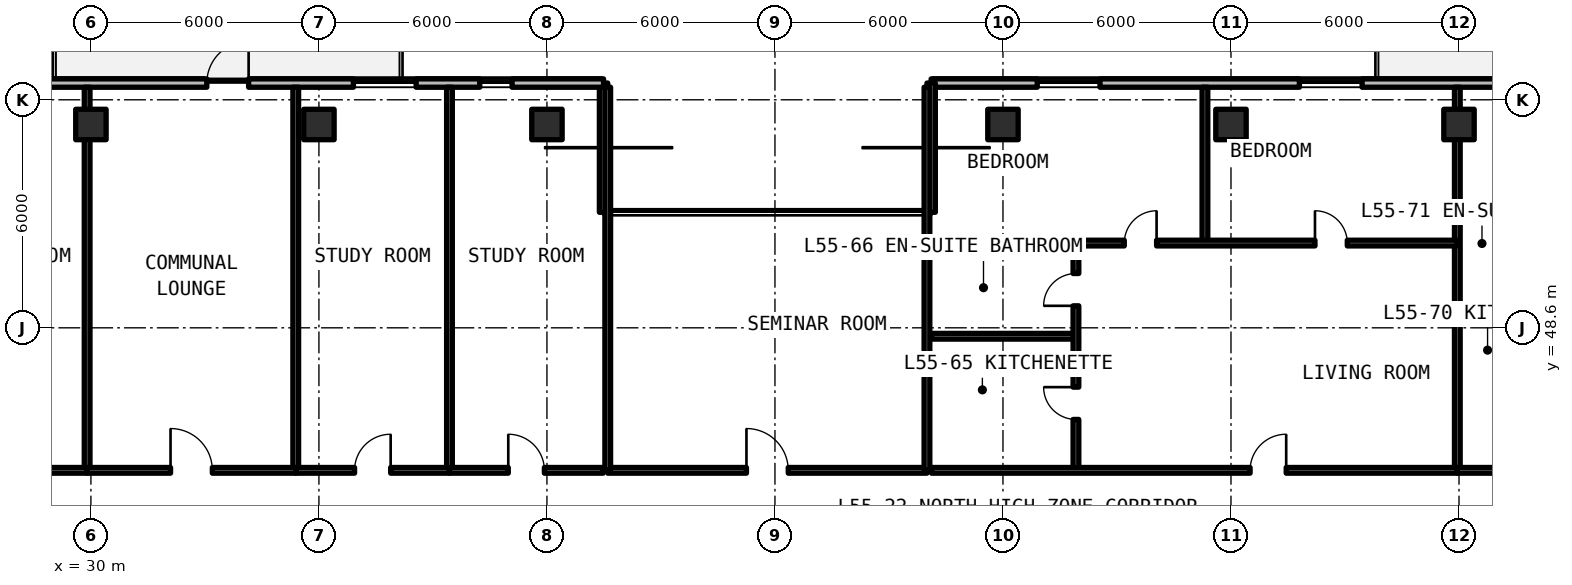
"""IFC4 building model, lengths in metres.
Left out: names, types, materials, properties, quantities, classifications, styles, units other than length and angle.
Written with IfcOpenShell. Run it as: python <this file> out.ifc"""

import sys

from ifc_helpers import new_model, si_unit, direction, frame, frame_2d, origin, origin_2d, place, context, subcontext, project, spatial, rectangle, extrude, element, fill, save


model = new_model("IFC4")
c1 = context("Model", 3, precision=1e-05, world=origin(), true_north=direction((0.0, 1.0)))
c2 = subcontext(c1, "Body", "Model", "MODEL_VIEW")
j1 = project(units=[si_unit("LENGTHUNIT", "METRE"), si_unit("PLANEANGLEUNIT", "RADIAN")], contexts=[c1])
p1 = place(None, origin())
s1 = spatial("IfcSite", under=j1, at=p1, CompositionType="ELEMENT")
p2 = place(p1, origin())
s2 = spatial("IfcBuilding", under=s1, at=p2, CompositionType="ELEMENT")
p3 = place(p2, frame((0.0, 0.0, 198.33)))
s3 = spatial("IfcBuildingStorey", under=s2, at=p3, CompositionType="ELEMENT", Elevation=198.33)
for number, where, z_axis, x_axis in (
    (1, (30.0, 53.95, 0.0), (0.0, 0.0, 1.0), (1.0, 0.0, 0.0)),
    (2, (36.0, 53.95, 0.0), (0.0, 0.0, 1.0), (1.0, 0.0, 0.0)),
    (3, (42.0, 53.95, 0.0), (0.0, 0.0, 1.0), (1.0, 0.0, 0.0)),
    (4, (54.0, 53.95, 0.0), (0.0, 0.0, 1.0), (1.0, 0.0, 0.0)),
    (5, (60.0, 53.95, 0.0), (0.0, 0.0, 1.0), (1.0, 0.0, 0.0)),
    (6, (66.0, 53.95, 0.0), (0.0, 0.0, 1.0), (1.0, 0.0, 0.0)),
):
    element("IfcColumn", number, at=place(p3, frame(where, z_axis=z_axis, x_axis=x_axis)), inside=s3, PredefinedType="COLUMN", context=c2, shape_type="SweptSolid", body=[
        extrude(rectangle(XDim=0.8, YDim=0.8, at=origin_2d()), origin(), (0.0, 0.0, 1.0), 3.3),
    ])
p4 = place(p3, frame((95.354, 55.04, 0.0), z_axis=(0.0, 0.0, 1.0), x_axis=(-1.0, 0.0, 0.0)))
e7 = element("IfcWall", 7, at=p4, inside=s3, PredefinedType="SOLIDWALL", context=c2, shape_type="SweptSolid", body=[
    extrude(rectangle(XDim=43.244, YDim=0.22, at=frame_2d((21.622, 0.0))), origin(), (0.0, 0.0, 1.0), 3.08),
])
p5 = place(p4, frame((26.404, 0.0, 0.0)))
e8 = element("IfcOpeningElement", 8, at=p5, cuts=e7, PredefinedType="OPENING", context=c2, shape_type="SweptSolid", body=[
    extrude(rectangle(XDim=1.1, YDim=2.15, at=frame_2d((0.55, 1.075))), frame((0.0, 0.12, 0.0), z_axis=(0.0, -1.0, 0.0), x_axis=(1.0, 0.0, 0.0)), (0.0, 0.0, 1.0), 0.24),
])
p6 = place(p4, frame((14.554, 0.0, 0.0)))
e9 = element("IfcOpeningElement", 9, at=p6, cuts=e7, PredefinedType="OPENING", context=c2, shape_type="SweptSolid", body=[
    extrude(rectangle(XDim=1.1, YDim=2.15, at=frame_2d((0.55, 1.075))), frame((0.0, 0.12, 0.0), z_axis=(0.0, -1.0, 0.0), x_axis=(1.0, 0.0, 0.0)), (0.0, 0.0, 1.0), 0.24),
])
p7 = place(p4, frame((38.802, 0.0, 0.78)))
e10 = element("IfcOpeningElement", 10, at=p7, cuts=e7, PredefinedType="OPENING", context=c2, shape_type="SweptSolid", body=[
    extrude(rectangle(XDim=1.65, YDim=1.66, at=frame_2d((0.825, 0.83))), frame((0.0, 0.12, 0.0), z_axis=(0.0, -1.0, 0.0), x_axis=(1.0, 0.0, 0.0)), (0.0, 0.0, 1.0), 0.24),
])
p8 = place(p4, frame((31.904, 0.0, 0.78)))
e11 = element("IfcOpeningElement", 11, at=p8, cuts=e7, PredefinedType="OPENING", context=c2, shape_type="SweptSolid", body=[
    extrude(rectangle(XDim=1.65, YDim=1.66, at=frame_2d((0.825, 0.83))), frame((0.0, 0.12, 0.0), z_axis=(0.0, -1.0, 0.0), x_axis=(1.0, 0.0, 0.0)), (0.0, 0.0, 1.0), 0.24),
])
p9 = place(p4, frame((7.682, 0.0, 0.78)))
e12 = element("IfcOpeningElement", 12, at=p9, cuts=e7, PredefinedType="OPENING", context=c2, shape_type="SweptSolid", body=[
    extrude(rectangle(XDim=0.85, YDim=1.65, at=frame_2d((0.425, 0.825))), frame((0.0, 0.12, 0.0), z_axis=(0.0, -1.0, 0.0), x_axis=(1.0, 0.0, 0.0)), (0.0, 0.0, 1.0), 0.24),
])
p10 = place(p4, frame((2.899, 0.0, 0.78)))
e13 = element("IfcOpeningElement", 13, at=p10, cuts=e7, PredefinedType="OPENING", context=c2, shape_type="SweptSolid", body=[
    extrude(rectangle(XDim=1.65, YDim=1.66, at=frame_2d((0.825, 0.83))), frame((0.0, 0.12, 0.0), z_axis=(0.0, -1.0, 0.0), x_axis=(1.0, 0.0, 0.0)), (0.0, 0.0, 1.0), 0.24),
])
for number, where, z_axis, x_axis in (
    (14, (52.11, 55.04, 0.0), (0.0, 0.0, 1.0), (0.0, -1.0, 0.0)),
    (15, (43.49, 51.64, 0.0), (0.0, 0.0, 1.0), (0.0, 1.0, 0.0)),
):
    element("IfcWall", number, at=place(p3, frame(where, z_axis=z_axis, x_axis=x_axis)), inside=s3, PredefinedType="SOLIDWALL", context=c2, shape_type="SweptSolid", body=[
        extrude(rectangle(XDim=3.4, YDim=0.22, at=frame_2d((1.7, 0.0))), origin(), (0.0, 0.0, 1.0), 3.08),
    ])
p11 = place(p3, frame((43.49, 55.04, 0.0), z_axis=(0.0, 0.0, 1.0), x_axis=(-1.0, 0.0, 0.0)))
e16 = element("IfcWall", 16, at=p11, inside=s3, PredefinedType="SOLIDWALL", context=c2, shape_type="SweptSolid", body=[
    extrude(rectangle(XDim=17.644, YDim=0.22, at=frame_2d((8.822, 0.0))), origin(), (0.0, 0.0, 1.0), 3.08),
])
p12 = place(p11, frame((9.34, 0.0, 0.0)))
e17 = element("IfcOpeningElement", 17, at=p12, cuts=e16, PredefinedType="OPENING", context=c2, shape_type="SweptSolid", body=[
    extrude(rectangle(XDim=1.1, YDim=2.15, at=frame_2d((0.55, 1.075))), frame((0.0, 0.12, 0.0), z_axis=(0.0, -1.0, 0.0), x_axis=(1.0, 0.0, 0.0)), (0.0, 0.0, 1.0), 0.24),
])
p13 = place(p11, frame((14.715, 0.0, 0.78)))
e18 = element("IfcOpeningElement", 18, at=p13, cuts=e16, PredefinedType="OPENING", context=c2, shape_type="SweptSolid", body=[
    extrude(rectangle(XDim=1.65, YDim=1.66, at=frame_2d((0.825, 0.83))), frame((0.0, 0.12, 0.0), z_axis=(0.0, -1.0, 0.0), x_axis=(1.0, 0.0, 0.0)), (0.0, 0.0, 1.0), 0.24),
])
p14 = place(p11, frame((4.932, 0.0, 0.78)))
e19 = element("IfcOpeningElement", 19, at=p14, cuts=e16, PredefinedType="OPENING", context=c2, shape_type="SweptSolid", body=[
    extrude(rectangle(XDim=1.65, YDim=1.66, at=frame_2d((0.825, 0.83))), frame((0.0, 0.12, 0.0), z_axis=(0.0, -1.0, 0.0), x_axis=(1.0, 0.0, 0.0)), (0.0, 0.0, 1.0), 0.24),
])
p15 = place(p11, frame((2.407, 0.0, 0.78)))
e20 = element("IfcOpeningElement", 20, at=p15, cuts=e16, PredefinedType="OPENING", context=c2, shape_type="SweptSolid", body=[
    extrude(rectangle(XDim=0.85, YDim=1.65, at=frame_2d((0.425, 0.825))), frame((0.0, 0.12, 0.0), z_axis=(0.0, -1.0, 0.0), x_axis=(1.0, 0.0, 0.0)), (0.0, 0.0, 1.0), 0.24),
])
p16 = place(p3, frame((43.6, 44.85, 0.0), z_axis=(0.0, 0.0, 1.0), x_axis=(1.0, 0.0, 0.0)))
e21 = element("IfcWall", 21, at=p16, inside=s3, PredefinedType="SOLIDWALL", context=c2, shape_type="SweptSolid", body=[
    extrude(rectangle(XDim=8.4, YDim=0.15, at=frame_2d((4.2, 0.0))), origin(), (0.0, 0.0, 1.0), 2.35),
])
p17 = place(p16, frame((3.65, 0.0, 0.0)))
e22 = element("IfcOpeningElement", 22, at=p17, cuts=e21, PredefinedType="OPENING", context=c2, shape_type="SweptSolid", body=[
    extrude(rectangle(XDim=1.1, YDim=2.15, at=frame_2d((0.55, 1.075))), frame((0.0, 0.085, 0.0), z_axis=(0.0, -1.0, 0.0), x_axis=(1.0, 0.0, 0.0)), (0.0, 0.0, 1.0), 0.17),
])
for number, where, z_axis, x_axis in (
    (23, (43.6, 44.85, 0.0), (0.0, 0.0, 1.0), (0.0, 1.0, 0.0)),
    (24, (52.0, 44.85, 0.0), (0.0, 0.0, 1.0), (0.0, 1.0, 0.0)),
    (25, (29.9, 44.85, 0.0), (0.0, 0.0, 1.0), (0.0, 1.0, 0.0)),
):
    element("IfcWall", number, at=place(p3, frame(where, z_axis=z_axis, x_axis=x_axis)), inside=s3, PredefinedType="SOLIDWALL", context=c2, shape_type="SweptSolid", body=[
        extrude(rectangle(XDim=10.08, YDim=0.15, at=frame_2d((5.04, 0.0))), origin(), (0.0, 0.0, 1.0), 2.35),
    ])
p18 = place(p3, frame((26.0, 44.85, 0.0), z_axis=(0.0, 0.0, 1.0), x_axis=(1.0, 0.0, 0.0)))
e26 = element("IfcWall", 26, at=p18, inside=s3, PredefinedType="SOLIDWALL", context=c2, shape_type="SweptSolid", body=[
    extrude(rectangle(XDim=3.9, YDim=0.15, at=frame_2d((1.95, 0.0))), origin(), (0.0, 0.0, 1.0), 2.35),
])
p19 = place(p18, frame((1.475, 0.0, 0.0)))
e27 = element("IfcOpeningElement", 27, at=p19, cuts=e26, PredefinedType="OPENING", context=c2, shape_type="SweptSolid", body=[
    extrude(rectangle(XDim=0.95, YDim=2.15, at=frame_2d((0.475, 1.075))), frame((0.0, 0.085, 0.0), z_axis=(0.0, -1.0, 0.0), x_axis=(1.0, 0.0, 0.0)), (0.0, 0.0, 1.0), 0.17),
])
p20 = place(p3, frame((35.39, 44.85, 0.0), z_axis=(0.0, 0.0, 1.0), x_axis=(0.0, 1.0, 0.0)))
e28 = element("IfcWall", 28, at=p20, inside=s3, PredefinedType="SOLIDWALL", context=c2, shape_type="SweptSolid", body=[
    extrude(rectangle(XDim=10.08, YDim=0.15, at=frame_2d((5.04, 0.0))), origin(), (0.0, 0.0, 1.0), 2.35),
])
p21 = place(p3, frame((29.9, 44.85, 0.0), z_axis=(0.0, 0.0, 1.0), x_axis=(1.0, 0.0, 0.0)))
e29 = element("IfcWall", 29, at=p21, inside=s3, PredefinedType="SOLIDWALL", context=c2, shape_type="SweptSolid", body=[
    extrude(rectangle(XDim=5.49, YDim=0.15, at=frame_2d((2.745, 0.0))), origin(), (0.0, 0.0, 1.0), 2.35),
])
p22 = place(p21, frame((2.195, 0.0, 0.0)))
e30 = element("IfcOpeningElement", 30, at=p22, cuts=e29, PredefinedType="OPENING", context=c2, shape_type="SweptSolid", body=[
    extrude(rectangle(XDim=1.1, YDim=2.15, at=frame_2d((0.55, 1.075))), frame((0.0, 0.085, 0.0), z_axis=(0.0, -1.0, 0.0), x_axis=(1.0, 0.0, 0.0)), (0.0, 0.0, 1.0), 0.17),
])
p23 = place(p3, frame((39.435, 44.85, 0.0), z_axis=(0.0, 0.0, 1.0), x_axis=(0.0, 1.0, 0.0)))
e31 = element("IfcWall", 31, at=p23, inside=s3, PredefinedType="SOLIDWALL", context=c2, shape_type="SweptSolid", body=[
    extrude(rectangle(XDim=10.08, YDim=0.15, at=frame_2d((5.04, 0.0))), origin(), (0.0, 0.0, 1.0), 2.35),
])
p24 = place(p3, frame((35.39, 44.85, 0.0), z_axis=(0.0, 0.0, 1.0), x_axis=(1.0, 0.0, 0.0)))
e32 = element("IfcWall", 32, at=p24, inside=s3, PredefinedType="SOLIDWALL", context=c2, shape_type="SweptSolid", body=[
    extrude(rectangle(XDim=4.045, YDim=0.15, at=frame_2d((2.022, 0.0))), origin(), (0.0, 0.0, 1.0), 2.35),
])
p25 = place(p24, frame((1.548, 0.0, 0.0)))
e33 = element("IfcOpeningElement", 33, at=p25, cuts=e32, PredefinedType="OPENING", context=c2, shape_type="SweptSolid", body=[
    extrude(rectangle(XDim=0.95, YDim=2.15, at=frame_2d((0.475, 1.075))), frame((0.0, 0.085, 0.0), z_axis=(0.0, -1.0, 0.0), x_axis=(1.0, 0.0, 0.0)), (0.0, 0.0, 1.0), 0.17),
])
p26 = place(p3, frame((39.435, 44.85, 0.0), z_axis=(0.0, 0.0, 1.0), x_axis=(1.0, 0.0, 0.0)))
e34 = element("IfcWall", 34, at=p26, inside=s3, PredefinedType="SOLIDWALL", context=c2, shape_type="SweptSolid", body=[
    extrude(rectangle(XDim=4.045, YDim=0.15, at=frame_2d((2.022, 0.0))), origin(), (0.0, 0.0, 1.0), 2.35),
])
p27 = place(p26, frame((1.547, 0.0, 0.0)))
e35 = element("IfcOpeningElement", 35, at=p27, cuts=e34, PredefinedType="OPENING", context=c2, shape_type="SweptSolid", body=[
    extrude(rectangle(XDim=0.95, YDim=2.15, at=frame_2d((0.475, 1.075))), frame((0.0, 0.085, 0.0), z_axis=(0.0, -1.0, 0.0), x_axis=(1.0, 0.0, 0.0)), (0.0, 0.0, 1.0), 0.17),
])
p28 = place(p3, frame((65.956, 44.85, 0.0), z_axis=(0.0, 0.0, 1.0), x_axis=(0.0, 1.0, 0.0)))
e36 = element("IfcWall", 36, at=p28, inside=s3, PredefinedType="SOLIDWALL", context=c2, shape_type="SweptSolid", body=[
    extrude(rectangle(XDim=10.08, YDim=0.15, at=frame_2d((5.04, 0.0))), origin(), (0.0, 0.0, 1.0), 2.35),
])
p29 = place(p3, frame((52.12, 48.378, 0.0), z_axis=(0.0, 0.0, 1.0), x_axis=(1.0, 0.0, 0.0)))
e37 = element("IfcWall", 37, at=p29, inside=s3, PredefinedType="PARTITIONING", context=c2, shape_type="SweptSolid", body=[
    extrude(rectangle(XDim=3.8, YDim=0.15, at=frame_2d((1.9, 0.0))), origin(), (0.0, 0.0, 1.0), 2.35),
])
p30 = place(p3, frame((55.92, 44.85, 0.0), z_axis=(0.0, 0.0, 1.0), x_axis=(0.0, 1.0, 0.0)))
e38 = element("IfcWall", 38, at=p30, inside=s3, PredefinedType="PARTITIONING", context=c2, shape_type="SweptSolid", body=[
    extrude(rectangle(XDim=5.98, YDim=0.15, at=frame_2d((2.99, 0.0))), origin(), (0.0, 0.0, 1.0), 2.35),
])
p31 = place(p30, frame((1.339, 0.0, 0.0)))
e39 = element("IfcOpeningElement", 39, at=p31, cuts=e38, PredefinedType="OPENING", context=c2, shape_type="SweptSolid", body=[
    extrude(rectangle(XDim=0.85, YDim=2.1, at=frame_2d((0.425, 1.05))), frame((0.0, 0.085, 0.0), z_axis=(0.0, -1.0, 0.0), x_axis=(1.0, 0.0, 0.0)), (0.0, 0.0, 1.0), 0.17),
])
p32 = place(p30, frame((4.329, 0.0, 0.0)))
e40 = element("IfcOpeningElement", 40, at=p32, cuts=e38, PredefinedType="OPENING", context=c2, shape_type="SweptSolid", body=[
    extrude(rectangle(XDim=0.85, YDim=2.1, at=frame_2d((0.425, 1.05))), frame((0.0, 0.085, 0.0), z_axis=(0.0, -1.0, 0.0), x_axis=(1.0, 0.0, 0.0)), (0.0, 0.0, 1.0), 0.17),
])
p33 = place(p3, frame((59.315, 50.83, 0.0), z_axis=(0.0, 0.0, 1.0), x_axis=(0.0, 1.0, 0.0)))
e41 = element("IfcWall", 41, at=p33, inside=s3, PredefinedType="PARTITIONING", context=c2, shape_type="SweptSolid", body=[
    extrude(rectangle(XDim=4.1, YDim=0.15, at=frame_2d((2.05, 0.0))), origin(), (0.0, 0.0, 1.0), 2.35),
])
p34 = place(p3, frame((52.12, 50.83, 0.0), z_axis=(0.0, 0.0, 1.0), x_axis=(1.0, 0.0, 0.0)))
e42 = element("IfcWall", 42, at=p34, inside=s3, PredefinedType="PARTITIONING", context=c2, shape_type="SweptSolid", body=[
    extrude(rectangle(XDim=13.836, YDim=0.15, at=frame_2d((6.918, 0.0))), origin(), (0.0, 0.0, 1.0), 2.35),
])
p35 = place(p34, frame((5.073, 0.0, 0.0)))
e43 = element("IfcOpeningElement", 43, at=p35, cuts=e42, PredefinedType="OPENING", context=c2, shape_type="SweptSolid", body=[
    extrude(rectangle(XDim=0.85, YDim=2.1, at=frame_2d((0.425, 1.05))), frame((0.0, 0.085, 0.0), z_axis=(0.0, -1.0, 0.0), x_axis=(1.0, 0.0, 0.0)), (0.0, 0.0, 1.0), 0.17),
])
p36 = place(p34, frame((10.09, 0.0, 0.0)))
e44 = element("IfcOpeningElement", 44, at=p36, cuts=e42, PredefinedType="OPENING", context=c2, shape_type="SweptSolid", body=[
    extrude(rectangle(XDim=0.85, YDim=2.1, at=frame_2d((0.425, 1.05))), frame((0.0, 0.085, 0.0), z_axis=(0.0, -1.0, 0.0), x_axis=(1.0, 0.0, 0.0)), (0.0, 0.0, 1.0), 0.17),
])
p37 = place(p3, frame((52.12, 44.85, 0.0), z_axis=(0.0, 0.0, 1.0), x_axis=(1.0, 0.0, 0.0)))
e45 = element("IfcWall", 45, at=p37, inside=s3, PredefinedType="SOLIDWALL", context=c2, shape_type="SweptSolid", body=[
    extrude(rectangle(XDim=13.836, YDim=0.15, at=frame_2d((6.918, 0.0))), origin(), (0.0, 0.0, 1.0), 2.35),
])
p38 = place(p37, frame((8.383, 0.0, 0.0)))
e46 = element("IfcOpeningElement", 46, at=p38, cuts=e45, PredefinedType="OPENING", context=c2, shape_type="SweptSolid", body=[
    extrude(rectangle(XDim=0.95, YDim=2.15, at=frame_2d((0.475, 1.075))), frame((0.0, 0.085, 0.0), z_axis=(0.0, -1.0, 0.0), x_axis=(1.0, 0.0, 0.0)), (0.0, 0.0, 1.0), 0.17),
])
p39 = place(p3, frame((65.956, 48.82, 0.0), z_axis=(0.0, 0.0, 1.0), x_axis=(1.0, 0.0, 0.0)))
e47 = element("IfcWall", 47, at=p39, inside=s3, PredefinedType="PARTITIONING", context=c2, shape_type="SweptSolid", body=[
    extrude(rectangle(XDim=2.35, YDim=0.15, at=frame_2d((1.175, 0.0))), origin(), (0.0, 0.0, 1.0), 2.35),
])
p40 = place(p3, frame((65.956, 51.58, 0.0), z_axis=(0.0, 0.0, 1.0), x_axis=(1.0, 0.0, 0.0)))
e48 = element("IfcWall", 48, at=p40, inside=s3, PredefinedType="PARTITIONING", context=c2, shape_type="SweptSolid", body=[
    extrude(rectangle(XDim=8.805, YDim=0.15, at=frame_2d((4.402, 0.0))), origin(), (0.0, 0.0, 1.0), 2.35),
])
p41 = place(p40, frame((5.192, 0.0, 0.0)))
e49 = element("IfcOpeningElement", 49, at=p41, cuts=e48, PredefinedType="OPENING", context=c2, shape_type="SweptSolid", body=[
    extrude(rectangle(XDim=0.85, YDim=2.1, at=frame_2d((0.425, 1.05))), frame((0.0, 0.085, 0.0), z_axis=(0.0, -1.0, 0.0), x_axis=(1.0, 0.0, 0.0)), (0.0, 0.0, 1.0), 0.17),
])
p42 = place(p3, frame((65.956, 44.85, 0.0), z_axis=(0.0, 0.0, 1.0), x_axis=(1.0, 0.0, 0.0)))
e50 = element("IfcWall", 50, at=p42, inside=s3, PredefinedType="SOLIDWALL", context=c2, shape_type="SweptSolid", body=[
    extrude(rectangle(XDim=8.805, YDim=0.15, at=frame_2d((4.402, 0.0))), origin(), (0.0, 0.0, 1.0), 2.35),
])
p43 = place(p42, frame((5.142, 0.0, 0.0)))
e51 = element("IfcOpeningElement", 51, at=p43, cuts=e50, PredefinedType="OPENING", context=c2, shape_type="SweptSolid", body=[
    extrude(rectangle(XDim=0.95, YDim=2.15, at=frame_2d((0.475, 1.075))), frame((0.0, 0.085, 0.0), z_axis=(0.0, -1.0, 0.0), x_axis=(1.0, 0.0, 0.0)), (0.0, 0.0, 1.0), 0.17),
])
p44 = place(p7, origin())
e52 = element("IfcWindow", 52, at=p44, inside=s3, PartitioningType="SINGLE_PANEL", PredefinedType="WINDOW", context=c2, shape_type="SweptSolid", body=[
    extrude(rectangle(XDim=1.65, YDim=1.66, at=frame_2d((0.825, 0.83))), frame((0.0, 0.03, 0.0), z_axis=(0.0, -1.0, 0.0), x_axis=(1.0, 0.0, 0.0)), (0.0, 0.0, 1.0), 0.06),
])
fill(e10, e52)
p45 = place(p8, origin())
e53 = element("IfcWindow", 53, at=p45, inside=s3, PartitioningType="SINGLE_PANEL", PredefinedType="WINDOW", context=c2, shape_type="SweptSolid", body=[
    extrude(rectangle(XDim=1.65, YDim=1.66, at=frame_2d((0.825, 0.83))), frame((0.0, 0.03, 0.0), z_axis=(0.0, -1.0, 0.0), x_axis=(1.0, 0.0, 0.0)), (0.0, 0.0, 1.0), 0.06),
])
fill(e11, e53)
p46 = place(p12, frame((1.1, 0.0, 0.0), z_axis=(0.0, 0.0, 1.0), x_axis=(-1.0, 0.0, 0.0)))
e54 = element("IfcDoor", 54, at=p46, inside=s3, OperationType="SINGLE_SWING_RIGHT", PredefinedType="DOOR", context=c2, shape_type="SweptSolid", body=[
    extrude(rectangle(XDim=1.1, YDim=2.15, at=frame_2d((0.55, 1.075))), frame((0.0, 0.025, 0.0), z_axis=(0.0, -1.0, 0.0), x_axis=(1.0, 0.0, 0.0)), (0.0, 0.0, 1.0), 0.05),
])
fill(e17, e54)
p47 = place(p14, origin())
e55 = element("IfcWindow", 55, at=p47, inside=s3, PartitioningType="SINGLE_PANEL", PredefinedType="WINDOW", context=c2, shape_type="SweptSolid", body=[
    extrude(rectangle(XDim=1.65, YDim=1.66, at=frame_2d((0.825, 0.83))), frame((0.0, 0.03, 0.0), z_axis=(0.0, -1.0, 0.0), x_axis=(1.0, 0.0, 0.0)), (0.0, 0.0, 1.0), 0.06),
])
fill(e19, e55)
p48 = place(p15, origin())
e56 = element("IfcWindow", 56, at=p48, inside=s3, PartitioningType="SINGLE_PANEL", PredefinedType="WINDOW", context=c2, shape_type="SweptSolid", body=[
    extrude(rectangle(XDim=0.85, YDim=1.65, at=frame_2d((0.425, 0.825))), frame((0.0, 0.03, 0.0), z_axis=(0.0, -1.0, 0.0), x_axis=(1.0, 0.0, 0.0)), (0.0, 0.0, 1.0), 0.06),
])
fill(e20, e56)
p49 = place(p17, origin())
e57 = element("IfcDoor", 57, at=p49, inside=s3, OperationType="SINGLE_SWING_LEFT", PredefinedType="DOOR", context=c2, shape_type="SweptSolid", body=[
    extrude(rectangle(XDim=1.1, YDim=2.15, at=frame_2d((0.55, 1.075))), frame((0.0, 0.025, 0.0), z_axis=(0.0, -1.0, 0.0), x_axis=(1.0, 0.0, 0.0)), (0.0, 0.0, 1.0), 0.05),
])
fill(e22, e57)
p50 = place(p22, origin())
e58 = element("IfcDoor", 58, at=p50, inside=s3, OperationType="SINGLE_SWING_LEFT", PredefinedType="DOOR", context=c2, shape_type="SweptSolid", body=[
    extrude(rectangle(XDim=1.1, YDim=2.15, at=frame_2d((0.55, 1.075))), frame((0.0, 0.025, 0.0), z_axis=(0.0, -1.0, 0.0), x_axis=(1.0, 0.0, 0.0)), (0.0, 0.0, 1.0), 0.05),
])
fill(e30, e58)
p51 = place(p25, origin())
e59 = element("IfcDoor", 59, at=p51, inside=s3, OperationType="SINGLE_SWING_RIGHT", PredefinedType="DOOR", context=c2, shape_type="SweptSolid", body=[
    extrude(rectangle(XDim=0.95, YDim=2.15, at=frame_2d((0.475, 1.075))), frame((0.0, 0.025, 0.0), z_axis=(0.0, -1.0, 0.0), x_axis=(1.0, 0.0, 0.0)), (0.0, 0.0, 1.0), 0.05),
])
fill(e33, e59)
p52 = place(p27, origin())
e60 = element("IfcDoor", 60, at=p52, inside=s3, OperationType="SINGLE_SWING_LEFT", PredefinedType="DOOR", context=c2, shape_type="SweptSolid", body=[
    extrude(rectangle(XDim=0.95, YDim=2.15, at=frame_2d((0.475, 1.075))), frame((0.0, 0.025, 0.0), z_axis=(0.0, -1.0, 0.0), x_axis=(1.0, 0.0, 0.0)), (0.0, 0.0, 1.0), 0.05),
])
fill(e35, e60)
p53 = place(p31, origin())
e61 = element("IfcDoor", 61, at=p53, inside=s3, OperationType="SINGLE_SWING_RIGHT", PredefinedType="DOOR", context=c2, shape_type="SweptSolid", body=[
    extrude(rectangle(XDim=0.85, YDim=2.1, at=frame_2d((0.425, 1.05))), frame((0.0, 0.025, 0.0), z_axis=(0.0, -1.0, 0.0), x_axis=(1.0, 0.0, 0.0)), (0.0, 0.0, 1.0), 0.05),
])
fill(e39, e61)
p54 = place(p32, origin())
e62 = element("IfcDoor", 62, at=p54, inside=s3, OperationType="SINGLE_SWING_LEFT", PredefinedType="DOOR", context=c2, shape_type="SweptSolid", body=[
    extrude(rectangle(XDim=0.85, YDim=2.1, at=frame_2d((0.425, 1.05))), frame((0.0, 0.025, 0.0), z_axis=(0.0, -1.0, 0.0), x_axis=(1.0, 0.0, 0.0)), (0.0, 0.0, 1.0), 0.05),
])
fill(e40, e62)
p55 = place(p35, origin())
e63 = element("IfcDoor", 63, at=p55, inside=s3, OperationType="SINGLE_SWING_RIGHT", PredefinedType="DOOR", context=c2, shape_type="SweptSolid", body=[
    extrude(rectangle(XDim=0.85, YDim=2.1, at=frame_2d((0.425, 1.05))), frame((0.0, 0.025, 0.0), z_axis=(0.0, -1.0, 0.0), x_axis=(1.0, 0.0, 0.0)), (0.0, 0.0, 1.0), 0.05),
])
fill(e43, e63)
p56 = place(p36, origin())
e64 = element("IfcDoor", 64, at=p56, inside=s3, OperationType="SINGLE_SWING_LEFT", PredefinedType="DOOR", context=c2, shape_type="SweptSolid", body=[
    extrude(rectangle(XDim=0.85, YDim=2.1, at=frame_2d((0.425, 1.05))), frame((0.0, 0.025, 0.0), z_axis=(0.0, -1.0, 0.0), x_axis=(1.0, 0.0, 0.0)), (0.0, 0.0, 1.0), 0.05),
])
fill(e44, e64)
p57 = place(p38, origin())
e65 = element("IfcDoor", 65, at=p57, inside=s3, OperationType="SINGLE_SWING_RIGHT", PredefinedType="DOOR", context=c2, shape_type="SweptSolid", body=[
    extrude(rectangle(XDim=0.95, YDim=2.15, at=frame_2d((0.475, 1.075))), frame((0.0, 0.025, 0.0), z_axis=(0.0, -1.0, 0.0), x_axis=(1.0, 0.0, 0.0)), (0.0, 0.0, 1.0), 0.05),
])
fill(e46, e65)
save(model, sys.argv[1])
